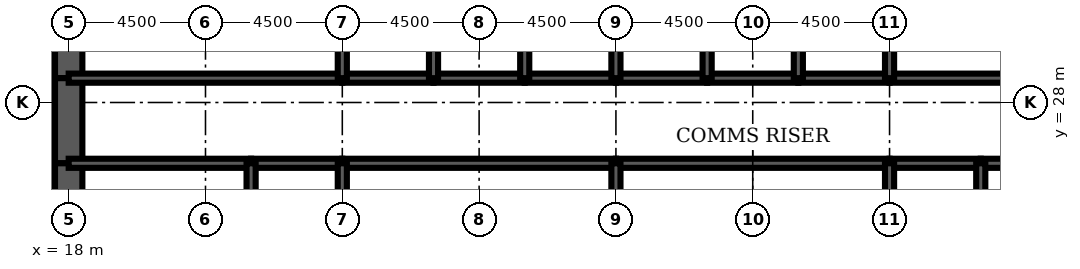
"""IFC4 building model, lengths in metres.
Left out: names, types, materials, properties, quantities, classifications, styles, units other than length and angle.
Written with IfcOpenShell. Run it as: python <this file> out.ifc"""

import sys

from ifc_helpers import new_model, si_unit, direction, frame, frame_2d, origin, place, context, subcontext, project, spatial, rectangle, extrude, element, fill, save


model = new_model("IFC4")
c1 = context("Model", 3, precision=1e-05, world=origin(), true_north=direction((0.0, 1.0)))
c2 = subcontext(c1, "Body", "Model", "MODEL_VIEW")
j1 = project(units=[si_unit("LENGTHUNIT", "METRE"), si_unit("PLANEANGLEUNIT", "RADIAN")], contexts=[c1])
p1 = place(None, origin())
s1 = spatial("IfcSite", under=j1, at=p1, CompositionType="ELEMENT")
p2 = place(p1, origin())
s2 = spatial("IfcBuilding", under=s1, at=p2, CompositionType="ELEMENT")
p3 = place(p2, frame((0.0, 0.0, 117.3)))
s3 = spatial("IfcBuildingStorey", under=s2, at=p3, CompositionType="ELEMENT", Elevation=117.3)
p4 = place(p3, frame((18.0, 32.0, 0.0), z_axis=(0.0, 0.0, 1.0), x_axis=(0.0, -1.0, 0.0)))
e1 = element("IfcWall", 1, at=p4, inside=s3, PredefinedType="SHEAR", context=c2, shape_type="SweptSolid", body=[
    extrude(rectangle(XDim=3.2, YDim=0.9, at=frame_2d((1.6, 0.0))), origin(), (0.0, 0.0, 1.0), 4.2),
])
p5 = place(p3, frame((18.0, 28.8, 0.0), z_axis=(0.0, 0.0, 1.0), x_axis=(0.0, -1.0, 0.0)))
e2 = element("IfcWall", 2, at=p5, inside=s3, PredefinedType="SHEAR", context=c2, shape_type="SweptSolid", body=[
    extrude(rectangle(XDim=2.8, YDim=0.9, at=frame_2d((1.4, 0.0))), origin(), (0.0, 0.0, 1.0), 4.2),
])
p6 = place(p5, frame((0.4, 0.0, 0.0)))
e3 = element("IfcOpeningElement", 3, at=p6, cuts=e2, PredefinedType="OPENING", context=c2, shape_type="SweptSolid", body=[
    extrude(rectangle(XDim=1.8, YDim=2.1, at=frame_2d((0.9, 1.05))), frame((0.0, 0.46, 0.0), z_axis=(0.0, -1.0, 0.0), x_axis=(1.0, 0.0, 0.0)), (0.0, 0.0, 1.0), 0.92),
])
p7 = place(p3, frame((18.0, 26.0, 0.0), z_axis=(0.0, 0.0, 1.0), x_axis=(0.0, -1.0, 0.0)))
e4 = element("IfcWall", 4, at=p7, inside=s3, PredefinedType="SHEAR", context=c2, shape_type="SweptSolid", body=[
    extrude(rectangle(XDim=4.0, YDim=0.9, at=frame_2d((2.0, 0.0))), origin(), (0.0, 0.0, 1.0), 4.2),
])
p8 = place(p3, frame((18.0, 28.8, 0.0), z_axis=(0.0, 0.0, 1.0), x_axis=(1.0, 0.0, 0.0)))
e5 = element("IfcWall", 5, at=p8, inside=s3, PredefinedType="SOLIDWALL", context=c2, shape_type="SweptSolid", body=[
    extrude(rectangle(XDim=9.0, YDim=0.3, at=frame_2d((4.5, 0.0))), origin(), (0.0, 0.0, 1.0), 4.2),
])
p9 = place(p8, frame((0.65, 0.0, 0.0)))
e6 = element("IfcOpeningElement", 6, at=p9, cuts=e5, PredefinedType="OPENING", context=c2, shape_type="SweptSolid", body=[
    extrude(rectangle(XDim=1.0, YDim=2.1, at=frame_2d((0.5, 1.05))), frame((0.0, 0.16, 0.0), z_axis=(0.0, -1.0, 0.0), x_axis=(1.0, 0.0, 0.0)), (0.0, 0.0, 1.0), 0.32),
])
p10 = place(p3, frame((27.0, 28.8, 0.0), z_axis=(0.0, 0.0, 1.0), x_axis=(1.0, 0.0, 0.0)))
e7 = element("IfcWall", 7, at=p10, inside=s3, PredefinedType="SOLIDWALL", context=c2, shape_type="SweptSolid", body=[
    extrude(rectangle(XDim=3.0, YDim=0.3, at=frame_2d((1.5, 0.0))), origin(), (0.0, 0.0, 1.0), 4.2),
])
p11 = place(p10, frame((0.95, 0.0, 0.0)))
e8 = element("IfcOpeningElement", 8, at=p11, cuts=e7, PredefinedType="OPENING", context=c2, shape_type="SweptSolid", body=[
    extrude(rectangle(XDim=1.1, YDim=2.2, at=frame_2d((0.55, 1.1))), frame((0.0, 0.16, 0.0), z_axis=(0.0, -1.0, 0.0), x_axis=(1.0, 0.0, 0.0)), (0.0, 0.0, 1.0), 0.32),
])
p12 = place(p3, frame((30.0, 28.8, 0.0), z_axis=(0.0, 0.0, 1.0), x_axis=(1.0, 0.0, 0.0)))
e9 = element("IfcWall", 9, at=p12, inside=s3, PredefinedType="SOLIDWALL", context=c2, shape_type="SweptSolid", body=[
    extrude(rectangle(XDim=3.0, YDim=0.3, at=frame_2d((1.5, 0.0))), origin(), (0.0, 0.0, 1.0), 4.2),
])
p13 = place(p12, frame((0.95, 0.0, 0.0)))
e10 = element("IfcOpeningElement", 10, at=p13, cuts=e9, PredefinedType="OPENING", context=c2, shape_type="SweptSolid", body=[
    extrude(rectangle(XDim=1.1, YDim=2.2, at=frame_2d((0.55, 1.1))), frame((0.0, 0.16, 0.0), z_axis=(0.0, -1.0, 0.0), x_axis=(1.0, 0.0, 0.0)), (0.0, 0.0, 1.0), 0.32),
])
p14 = place(p3, frame((33.0, 28.8, 0.0), z_axis=(0.0, 0.0, 1.0), x_axis=(1.0, 0.0, 0.0)))
e11 = element("IfcWall", 11, at=p14, inside=s3, PredefinedType="SOLIDWALL", context=c2, shape_type="SweptSolid", body=[
    extrude(rectangle(XDim=3.0, YDim=0.3, at=frame_2d((1.5, 0.0))), origin(), (0.0, 0.0, 1.0), 4.2),
])
p15 = place(p14, frame((0.95, 0.0, 0.0)))
e12 = element("IfcOpeningElement", 12, at=p15, cuts=e11, PredefinedType="OPENING", context=c2, shape_type="SweptSolid", body=[
    extrude(rectangle(XDim=1.1, YDim=2.2, at=frame_2d((0.55, 1.1))), frame((0.0, 0.16, 0.0), z_axis=(0.0, -1.0, 0.0), x_axis=(1.0, 0.0, 0.0)), (0.0, 0.0, 1.0), 0.32),
])
for number, where, z_axis, x_axis in (
    (13, (36.0, 28.8, 0.0), (0.0, 0.0, 1.0), (1.0, 0.0, 0.0)),
    (14, (39.0, 28.8, 0.0), (0.0, 0.0, 1.0), (1.0, 0.0, 0.0)),
):
    element("IfcWall", number, at=place(p3, frame(where, z_axis=z_axis, x_axis=x_axis)), inside=s3, PredefinedType="SOLIDWALL", context=c2, shape_type="SweptSolid", body=[
        extrude(rectangle(XDim=3.0, YDim=0.3, at=frame_2d((1.5, 0.0))), origin(), (0.0, 0.0, 1.0), 4.2),
    ])
p16 = place(p3, frame((42.0, 28.8, 0.0), z_axis=(0.0, 0.0, 1.0), x_axis=(1.0, 0.0, 0.0)))
e15 = element("IfcWall", 15, at=p16, inside=s3, PredefinedType="SOLIDWALL", context=c2, shape_type="SweptSolid", body=[
    extrude(rectangle(XDim=3.0, YDim=0.3, at=frame_2d((1.5, 0.0))), origin(), (0.0, 0.0, 1.0), 4.2),
])
p17 = place(p16, frame((0.95, 0.0, 0.0)))
e16 = element("IfcOpeningElement", 16, at=p17, cuts=e15, PredefinedType="OPENING", context=c2, shape_type="SweptSolid", body=[
    extrude(rectangle(XDim=1.1, YDim=2.2, at=frame_2d((0.55, 1.1))), frame((0.0, 0.16, 0.0), z_axis=(0.0, -1.0, 0.0), x_axis=(1.0, 0.0, 0.0)), (0.0, 0.0, 1.0), 0.32),
])
p18 = place(p3, frame((45.0, 28.8, 0.0), z_axis=(0.0, 0.0, 1.0), x_axis=(1.0, 0.0, 0.0)))
e17 = element("IfcWall", 17, at=p18, inside=s3, PredefinedType="SOLIDWALL", context=c2, shape_type="SweptSolid", body=[
    extrude(rectangle(XDim=9.0, YDim=0.3, at=frame_2d((4.5, 0.0))), origin(), (0.0, 0.0, 1.0), 4.2),
])
p19 = place(p18, frame((7.35, 0.0, 0.0)))
e18 = element("IfcOpeningElement", 18, at=p19, cuts=e17, PredefinedType="OPENING", context=c2, shape_type="SweptSolid", body=[
    extrude(rectangle(XDim=1.0, YDim=2.1, at=frame_2d((0.5, 1.05))), frame((0.0, 0.16, 0.0), z_axis=(0.0, -1.0, 0.0), x_axis=(1.0, 0.0, 0.0)), (0.0, 0.0, 1.0), 0.32),
])
p20 = place(p3, frame((18.0, 26.0, 0.0), z_axis=(0.0, 0.0, 1.0), x_axis=(1.0, 0.0, 0.0)))
e19 = element("IfcWall", 19, at=p20, inside=s3, PredefinedType="SOLIDWALL", context=c2, shape_type="SweptSolid", body=[
    extrude(rectangle(XDim=6.0, YDim=0.3, at=frame_2d((3.0, 0.0))), origin(), (0.0, 0.0, 1.0), 4.2),
])
p21 = place(p3, frame((24.0, 26.0, 0.0), z_axis=(0.0, 0.0, 1.0), x_axis=(1.0, 0.0, 0.0)))
e20 = element("IfcWall", 20, at=p21, inside=s3, PredefinedType="SOLIDWALL", context=c2, shape_type="SweptSolid", body=[
    extrude(rectangle(XDim=3.0, YDim=0.3, at=frame_2d((1.5, 0.0))), origin(), (0.0, 0.0, 1.0), 4.2),
])
for number, where, z_axis, x_axis in (
    (21, (27.0, 26.0, 0.0), (0.0, 0.0, 1.0), (1.0, 0.0, 0.0)),
    (22, (36.0, 26.0, 0.0), (0.0, 0.0, 1.0), (1.0, 0.0, 0.0)),
):
    element("IfcWall", number, at=place(p3, frame(where, z_axis=z_axis, x_axis=x_axis)), inside=s3, PredefinedType="SOLIDWALL", context=c2, shape_type="SweptSolid", body=[
        extrude(rectangle(XDim=9.0, YDim=0.3, at=frame_2d((4.5, 0.0))), origin(), (0.0, 0.0, 1.0), 4.2),
    ])
p22 = place(p3, frame((45.0, 26.0, 0.0), z_axis=(0.0, 0.0, 1.0), x_axis=(1.0, 0.0, 0.0)))
e23 = element("IfcWall", 23, at=p22, inside=s3, PredefinedType="SOLIDWALL", context=c2, shape_type="SweptSolid", body=[
    extrude(rectangle(XDim=3.0, YDim=0.3, at=frame_2d((1.5, 0.0))), origin(), (0.0, 0.0, 1.0), 4.2),
])
p23 = place(p3, frame((48.0, 26.0, 0.0), z_axis=(0.0, 0.0, 1.0), x_axis=(1.0, 0.0, 0.0)))
e24 = element("IfcWall", 24, at=p23, inside=s3, PredefinedType="SOLIDWALL", context=c2, shape_type="SweptSolid", body=[
    extrude(rectangle(XDim=6.0, YDim=0.3, at=frame_2d((3.0, 0.0))), origin(), (0.0, 0.0, 1.0), 4.2),
])
for number, where, z_axis, x_axis in (
    (25, (27.0, 28.8, 0.0), (0.0, 0.0, 1.0), (0.0, 1.0, 0.0)),
    (26, (30.0, 28.8, 0.0), (0.0, 0.0, 1.0), (0.0, 1.0, 0.0)),
    (27, (33.0, 28.8, 0.0), (0.0, 0.0, 1.0), (0.0, 1.0, 0.0)),
    (28, (36.0, 28.8, 0.0), (0.0, 0.0, 1.0), (0.0, 1.0, 0.0)),
    (29, (39.0, 28.8, 0.0), (0.0, 0.0, 1.0), (0.0, 1.0, 0.0)),
    (30, (42.0, 28.8, 0.0), (0.0, 0.0, 1.0), (0.0, 1.0, 0.0)),
    (31, (45.0, 28.8, 0.0), (0.0, 0.0, 1.0), (0.0, 1.0, 0.0)),
):
    element("IfcWall", number, at=place(p3, frame(where, z_axis=z_axis, x_axis=x_axis)), inside=s3, PredefinedType="SOLIDWALL", context=c2, shape_type="SweptSolid", body=[
        extrude(rectangle(XDim=3.2, YDim=0.3, at=frame_2d((1.6, 0.0))), origin(), (0.0, 0.0, 1.0), 4.2),
    ])
for number, where, z_axis, x_axis in (
    (32, (24.0, 22.0, 0.0), (0.0, 0.0, 1.0), (0.0, 1.0, 0.0)),
    (33, (27.0, 22.0, 0.0), (0.0, 0.0, 1.0), (0.0, 1.0, 0.0)),
    (34, (36.0, 22.0, 0.0), (0.0, 0.0, 1.0), (0.0, 1.0, 0.0)),
    (35, (45.0, 22.0, 0.0), (0.0, 0.0, 1.0), (0.0, 1.0, 0.0)),
    (36, (48.0, 22.0, 0.0), (0.0, 0.0, 1.0), (0.0, 1.0, 0.0)),
):
    element("IfcWall", number, at=place(p3, frame(where, z_axis=z_axis, x_axis=x_axis)), inside=s3, PredefinedType="SOLIDWALL", context=c2, shape_type="SweptSolid", body=[
        extrude(rectangle(XDim=4.0, YDim=0.3, at=frame_2d((2.0, 0.0))), origin(), (0.0, 0.0, 1.0), 4.2),
    ])
p24 = place(p3, frame((38.5, 22.15, 0.0), z_axis=(0.0, 0.0, 1.0), x_axis=(0.0, 1.0, 0.0)))
e37 = element("IfcWall", 37, at=p24, inside=s3, PredefinedType="PARTITIONING", context=c2, shape_type="SweptSolid", body=[
    extrude(rectangle(XDim=3.7, YDim=0.15, at=frame_2d((1.85, 0.0))), origin(), (0.0, 0.0, 1.0), 3.0),
])
p25 = place(p24, frame((2.2, 0.0, 0.0)))
e38 = element("IfcOpeningElement", 38, at=p25, cuts=e37, PredefinedType="OPENING", context=c2, shape_type="SweptSolid", body=[
    extrude(rectangle(XDim=1.0, YDim=2.1, at=frame_2d((0.5, 1.05))), frame((0.0, 0.085, 0.0), z_axis=(0.0, -1.0, 0.0), x_axis=(1.0, 0.0, 0.0)), (0.0, 0.0, 1.0), 0.17),
])
p26 = place(p3, frame((47.7, 26.15, 0.0), z_axis=(0.0, 0.0, 1.0), x_axis=(0.0, 1.0, 0.0)))
e39 = element("IfcWall", 39, at=p26, inside=s3, PredefinedType="PARTITIONING", context=c2, shape_type="SweptSolid", body=[
    extrude(rectangle(XDim=2.5, YDim=0.15, at=frame_2d((1.25, 0.0))), origin(), (0.0, 0.0, 1.0), 3.0),
])
p27 = place(p26, frame((1.15, 0.0, 0.0)))
e40 = element("IfcOpeningElement", 40, at=p27, cuts=e39, PredefinedType="OPENING", context=c2, shape_type="SweptSolid", body=[
    extrude(rectangle(XDim=1.0, YDim=2.1, at=frame_2d((0.5, 1.05))), frame((0.0, 0.085, 0.0), z_axis=(0.0, -1.0, 0.0), x_axis=(1.0, 0.0, 0.0)), (0.0, 0.0, 1.0), 0.17),
])
p28 = place(p25, origin())
e41 = element("IfcDoor", 41, at=p28, inside=s3, OperationType="SINGLE_SWING_RIGHT", PredefinedType="DOOR", context=c2, shape_type="SweptSolid", body=[
    extrude(rectangle(XDim=1.0, YDim=2.1, at=frame_2d((0.5, 1.05))), frame((0.0, 0.025, 0.0), z_axis=(0.0, -1.0, 0.0), x_axis=(1.0, 0.0, 0.0)), (0.0, 0.0, 1.0), 0.05),
])
fill(e38, e41)
p29 = place(p27, origin())
e42 = element("IfcDoor", 42, at=p29, inside=s3, OperationType="SINGLE_SWING_RIGHT", PredefinedType="DOOR", context=c2, shape_type="SweptSolid", body=[
    extrude(rectangle(XDim=1.0, YDim=2.1, at=frame_2d((0.5, 1.05))), frame((0.0, 0.025, 0.0), z_axis=(0.0, -1.0, 0.0), x_axis=(1.0, 0.0, 0.0)), (0.0, 0.0, 1.0), 0.05),
])
fill(e40, e42)
p30 = place(p17, origin())
e43 = element("IfcDoor", 43, at=p30, inside=s3, OperationType="DOUBLE_DOOR_SLIDING", PredefinedType="USERDEFINED", context=c2, shape_type="SweptSolid", body=[
    extrude(rectangle(XDim=1.1, YDim=2.2, at=frame_2d((0.55, 1.1))), frame((0.0, 0.025, 0.0), z_axis=(0.0, -1.0, 0.0), x_axis=(1.0, 0.0, 0.0)), (0.0, 0.0, 1.0), 0.05),
])
fill(e16, e43)
p31 = place(p11, origin())
e44 = element("IfcDoor", 44, at=p31, inside=s3, OperationType="DOUBLE_DOOR_SLIDING", PredefinedType="USERDEFINED", context=c2, shape_type="SweptSolid", body=[
    extrude(rectangle(XDim=1.1, YDim=2.2, at=frame_2d((0.55, 1.1))), frame((0.0, 0.025, 0.0), z_axis=(0.0, -1.0, 0.0), x_axis=(1.0, 0.0, 0.0)), (0.0, 0.0, 1.0), 0.05),
])
fill(e8, e44)
p32 = place(p13, origin())
e45 = element("IfcDoor", 45, at=p32, inside=s3, OperationType="DOUBLE_DOOR_SLIDING", PredefinedType="USERDEFINED", context=c2, shape_type="SweptSolid", body=[
    extrude(rectangle(XDim=1.1, YDim=2.2, at=frame_2d((0.55, 1.1))), frame((0.0, 0.025, 0.0), z_axis=(0.0, -1.0, 0.0), x_axis=(1.0, 0.0, 0.0)), (0.0, 0.0, 1.0), 0.05),
])
fill(e10, e45)
p33 = place(p15, origin())
e46 = element("IfcDoor", 46, at=p33, inside=s3, OperationType="DOUBLE_DOOR_SLIDING", PredefinedType="USERDEFINED", context=c2, shape_type="SweptSolid", body=[
    extrude(rectangle(XDim=1.1, YDim=2.2, at=frame_2d((0.55, 1.1))), frame((0.0, 0.025, 0.0), z_axis=(0.0, -1.0, 0.0), x_axis=(1.0, 0.0, 0.0)), (0.0, 0.0, 1.0), 0.05),
])
fill(e12, e46)
p34 = place(p9, origin())
e47 = element("IfcDoor", 47, at=p34, inside=s3, OperationType="SINGLE_SWING_LEFT", PredefinedType="DOOR", context=c2, shape_type="SweptSolid", body=[
    extrude(rectangle(XDim=1.0, YDim=2.1, at=frame_2d((0.5, 1.05))), frame((0.0, 0.025, 0.0), z_axis=(0.0, -1.0, 0.0), x_axis=(1.0, 0.0, 0.0)), (0.0, 0.0, 1.0), 0.05),
])
fill(e6, e47)
p35 = place(p6, origin())
e48 = element("IfcDoor", 48, at=p35, inside=s3, OperationType="SINGLE_SWING_LEFT", PredefinedType="DOOR", context=c2, shape_type="SweptSolid", body=[
    extrude(rectangle(XDim=1.8, YDim=2.1, at=frame_2d((0.9, 1.05))), frame((0.0, 0.45, 0.0), z_axis=(0.0, -1.0, 0.0), x_axis=(1.0, 0.0, 0.0)), (0.0, 0.0, 1.0), 0.899),
])
fill(e3, e48)
save(model, sys.argv[1])
